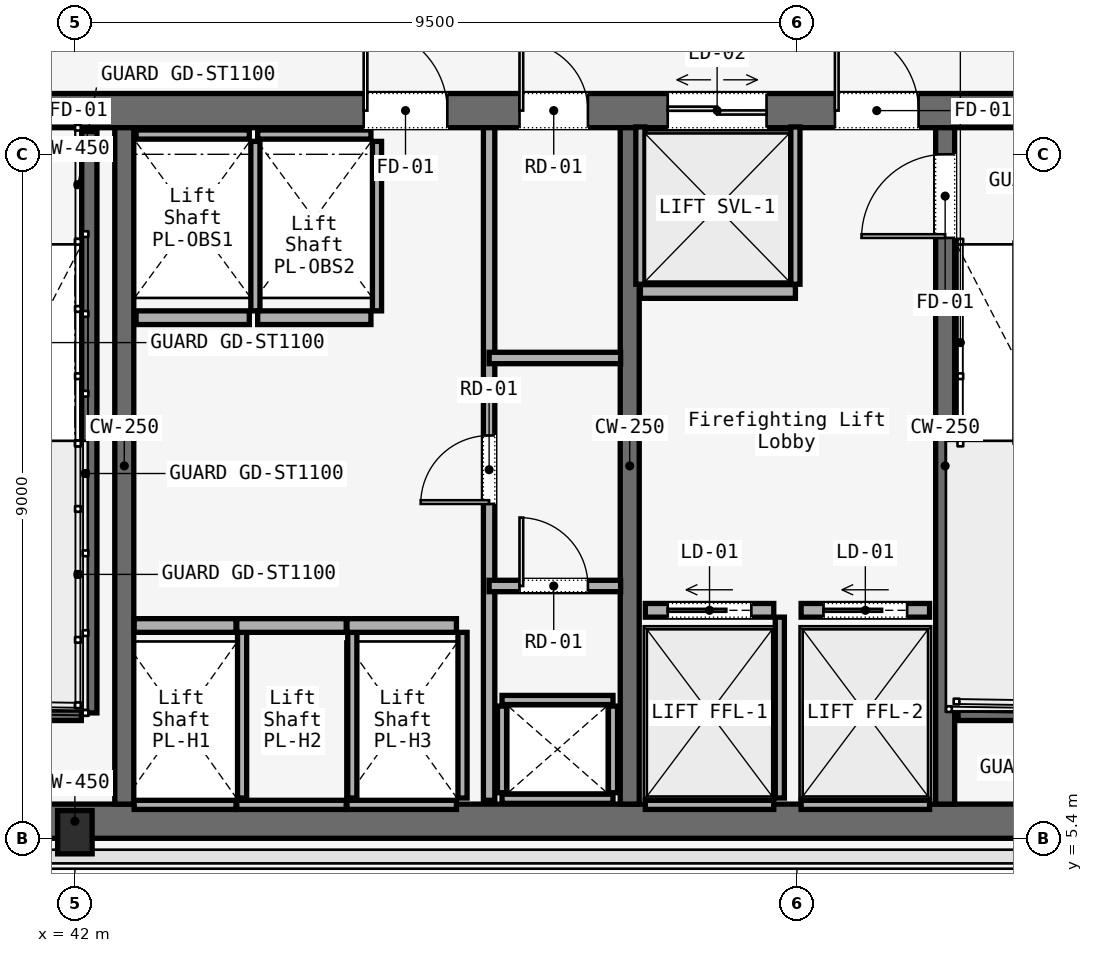
"""IFC4 building model, lengths in metres.
Left out: names, types, materials, properties, quantities, classifications, styles, units other than length and angle.
Written with IfcOpenShell. Run it as: python <this file> out.ifc"""

import sys

from ifc_helpers import new_model, si_unit, direction, frame, frame_2d, origin, origin_2d, place, context, subcontext, project, spatial, rectangle, i_section, extrude, element, fill, save


model = new_model("IFC4")
c1 = context("Model", 3, precision=1e-05, world=origin(), true_north=direction((0.0, 1.0)))
c2 = subcontext(c1, "Body", "Model", "MODEL_VIEW")
j1 = project(units=[si_unit("LENGTHUNIT", "METRE"), si_unit("PLANEANGLEUNIT", "RADIAN")], contexts=[c1])
p1 = place(None, origin())
s1 = spatial("IfcSite", under=j1, at=p1, CompositionType="ELEMENT")
p2 = place(p1, origin())
s2 = spatial("IfcBuilding", under=s1, at=p2, CompositionType="ELEMENT")
p3 = place(p2, frame((0.0, 0.0, 39.8)))
s3 = spatial("IfcBuildingStorey", under=s2, at=p3, CompositionType="ELEMENT", Elevation=39.8)
p4 = place(p3, frame((26.45, 14.975, 0.0), z_axis=(0.0, 0.0, 1.0), x_axis=(1.0, 0.0, 0.0)))
e1 = element("IfcWall", 1, at=p4, inside=s3, PredefinedType="SOLIDWALL", context=c2, shape_type="SweptSolid", body=[
    extrude(rectangle(XDim=31.1, YDim=0.45, at=frame_2d((15.55, 0.0))), origin(), (0.0, 0.0, 1.0), 3.58),
])
p5 = place(p4, frame((1.65, 0.0, 0.0)))
e2 = element("IfcOpeningElement", 2, at=p5, cuts=e1, PredefinedType="OPENING", context=c2, shape_type="SweptSolid", body=[
    extrude(rectangle(XDim=1.1, YDim=2.2, at=frame_2d((0.55, 1.1))), frame((0.0, 0.225, 0.0), z_axis=(0.0, -1.0, 0.0), x_axis=(1.0, 0.0, 0.0)), (0.0, 0.0, 1.0), 0.45),
])
p6 = place(p4, frame((13.65, 0.0, 0.0)))
e3 = element("IfcOpeningElement", 3, at=p6, cuts=e1, PredefinedType="OPENING", context=c2, shape_type="SweptSolid", body=[
    extrude(rectangle(XDim=1.1, YDim=2.2, at=frame_2d((0.55, 1.1))), frame((0.0, 0.225, 0.0), z_axis=(0.0, -1.0, 0.0), x_axis=(1.0, 0.0, 0.0)), (0.0, 0.0, 1.0), 0.45),
])
p7 = place(p4, frame((25.55, 0.0, 0.0)))
e4 = element("IfcOpeningElement", 4, at=p7, cuts=e1, PredefinedType="OPENING", context=c2, shape_type="SweptSolid", body=[
    extrude(rectangle(XDim=1.1, YDim=2.2, at=frame_2d((0.55, 1.1))), frame((0.0, 0.225, 0.0), z_axis=(0.0, -1.0, 0.0), x_axis=(1.0, 0.0, 0.0)), (0.0, 0.0, 1.0), 0.45),
])
p8 = place(p4, frame((10.7, 0.0, 0.0)))
e5 = element("IfcOpeningElement", 5, at=p8, cuts=e1, PredefinedType="OPENING", context=c2, shape_type="SweptSolid", body=[
    extrude(rectangle(XDim=1.4, YDim=2.2, at=frame_2d((0.7, 1.1))), frame((0.0, 0.225, 0.0), z_axis=(0.0, -1.0, 0.0), x_axis=(1.0, 0.0, 0.0)), (0.0, 0.0, 1.0), 0.45),
])
p9 = place(p4, frame((19.35, 0.0, 0.0)))
e6 = element("IfcOpeningElement", 6, at=p9, cuts=e1, PredefinedType="OPENING", context=c2, shape_type="SweptSolid", body=[
    extrude(rectangle(XDim=1.1, YDim=2.2, at=frame_2d((0.55, 1.1))), frame((0.0, 0.225, 0.0), z_axis=(0.0, -1.0, 0.0), x_axis=(1.0, 0.0, 0.0)), (0.0, 0.0, 1.0), 0.45),
])
p10 = place(p4, frame((21.4, 0.0, 0.0)))
e7 = element("IfcOpeningElement", 7, at=p10, cuts=e1, PredefinedType="OPENING", context=c2, shape_type="SweptSolid", body=[
    extrude(rectangle(XDim=0.9, YDim=2.1, at=frame_2d((0.45, 1.05))), frame((0.0, 0.225, 0.0), z_axis=(0.0, -1.0, 0.0), x_axis=(1.0, 0.0, 0.0)), (0.0, 0.0, 1.0), 0.45),
])
p11 = place(p4, frame((23.35, 0.0, 0.0)))
e8 = element("IfcOpeningElement", 8, at=p11, cuts=e1, PredefinedType="OPENING", context=c2, shape_type="SweptSolid", body=[
    extrude(rectangle(XDim=1.3, YDim=2.3, at=frame_2d((0.65, 1.15))), frame((0.0, 0.225, 0.0), z_axis=(0.0, -1.0, 0.0), x_axis=(1.0, 0.0, 0.0)), (0.0, 0.0, 1.0), 0.45),
])
p12 = place(p3, frame((26.45, 5.625, 0.0), z_axis=(0.0, 0.0, 1.0), x_axis=(1.0, 0.0, 0.0)))
e9 = element("IfcWall", 9, at=p12, inside=s3, PredefinedType="SOLIDWALL", context=c2, shape_type="SweptSolid", body=[
    extrude(rectangle(XDim=31.1, YDim=0.45, at=frame_2d((15.55, 0.0))), origin(), (0.0, 0.0, 1.0), 3.58),
])
for number, where, z_axis, x_axis in (
    (10, (42.65, 5.85, 0.0), (0.0, 0.0, 1.0), (0.0, 1.0, 0.0)),
    (11, (49.3, 5.85, 0.0), (0.0, 0.0, 1.0), (0.0, 1.0, 0.0)),
):
    element("IfcWall", number, at=place(p3, frame(where, z_axis=z_axis, x_axis=x_axis)), inside=s3, PredefinedType="SOLIDWALL", context=c2, shape_type="SweptSolid", body=[
        extrude(rectangle(XDim=8.9, YDim=0.25, at=frame_2d((4.45, 0.0))), origin(), (0.0, 0.0, 1.0), 3.58),
    ])
p13 = place(p3, frame((53.45, 5.85, 0.0), z_axis=(0.0, 0.0, 1.0), x_axis=(0.0, 1.0, 0.0)))
e12 = element("IfcWall", 12, at=p13, inside=s3, PredefinedType="SOLIDWALL", context=c2, shape_type="SweptSolid", body=[
    extrude(rectangle(XDim=8.9, YDim=0.25, at=frame_2d((4.45, 0.0))), origin(), (0.0, 0.0, 1.0), 3.58),
])
p14 = place(p13, frame((7.45, 0.0, 0.0)))
e13 = element("IfcOpeningElement", 13, at=p14, cuts=e12, PredefinedType="OPENING", context=c2, shape_type="SweptSolid", body=[
    extrude(rectangle(XDim=1.1, YDim=2.2, at=frame_2d((0.55, 1.1))), frame((0.0, 0.125, 0.0), z_axis=(0.0, -1.0, 0.0), x_axis=(1.0, 0.0, 0.0)), (0.0, 0.0, 1.0), 0.25),
])
p15 = place(p3, frame((42.0, 5.48, 0.0), z_axis=(0.0, 0.0, 1.0), x_axis=(1.0, 0.0, 0.0)))
e14 = element("IfcColumn", 14, at=p15, inside=s3, PredefinedType="COLUMN", context=c2, shape_type="SweptSolid", body=[
    extrude(i_section(OverallWidth=0.454, OverallDepth=0.569, WebThickness=0.078, FlangeThickness=0.08, FilletRadius=0.015, at=origin_2d()), origin(), (0.0, 0.0, 1.0), 3.58),
])
p16 = place(p3, frame((42.19, 14.7, 0.0), z_axis=(0.0, 0.0, 1.0), x_axis=(0.0, -1.0, 0.0)))
e15 = element("IfcWall", 15, at=p16, inside=s3, PredefinedType="SOLIDWALL", context=c2, shape_type="SweptSolid", body=[
    extrude(rectangle(XDim=7.65, YDim=0.2, at=frame_2d((3.825, 0.0))), origin(), (0.0, 0.0, 1.0), 3.8),
])
for number, where, z_axis, x_axis in (
    (16, (38.97, 7.05, 0.0), (0.0, 0.0, 1.0), (1.0, 0.0, 0.0)),
    (17, (53.62, 7.05, 0.0), (0.0, 0.0, 1.0), (1.0, 0.0, 0.0)),
):
    element("IfcWall", number, at=place(p3, frame(where, z_axis=z_axis, x_axis=x_axis)), inside=s3, PredefinedType="SOLIDWALL", context=c2, shape_type="SweptSolid", body=[
        extrude(rectangle(XDim=3.115, YDim=0.2, at=frame_2d((1.558, 0.0))), origin(), (0.0, 0.0, 1.0), 3.8),
    ])
for number, where, z_axis, x_axis in (
    (18, (47.62, 5.92, 0.0), (0.0, 0.0, 1.0), (1.0, 0.0, 0.0)),
    (19, (47.62, 7.22, 0.0), (0.0, 0.0, 1.0), (1.0, 0.0, 0.0)),
):
    element("IfcWall", number, at=place(p3, frame(where, z_axis=z_axis, x_axis=x_axis)), inside=s3, PredefinedType="SOLIDWALL", context=c2, shape_type="SweptSolid", body=[
        extrude(rectangle(XDim=1.46, YDim=0.12, at=frame_2d((0.73, 0.0))), origin(), (0.0, 0.0, 1.0), 2.933),
    ])
for number, where, z_axis, x_axis in (
    (20, (47.62, 6.0, 0.0), (0.0, 0.0, 1.0), (0.0, 1.0, 0.0)),
    (21, (49.08, 6.0, 0.0), (0.0, 0.0, 1.0), (0.0, 1.0, 0.0)),
):
    element("IfcWall", number, at=place(p3, frame(where, z_axis=z_axis, x_axis=x_axis)), inside=s3, PredefinedType="SOLIDWALL", context=c2, shape_type="SweptSolid", body=[
        extrude(rectangle(XDim=1.14, YDim=0.12, at=frame_2d((0.57, 0.0))), origin(), (0.0, 0.0, 1.0), 2.933),
    ])
p17 = place(p3, frame((47.45, 5.9, 0.0), z_axis=(0.0, 0.0, 1.0), x_axis=(0.0, 1.0, 0.0)))
e22 = element("IfcWall", 22, at=p17, inside=s3, PredefinedType="PARTITIONING", context=c2, shape_type="SweptSolid", body=[
    extrude(rectangle(XDim=8.85, YDim=0.15, at=frame_2d((4.425, 0.0))), origin(), (0.0, 0.0, 1.0), 2.933),
])
p18 = place(p17, frame((3.9, 0.0, 0.0)))
e23 = element("IfcOpeningElement", 23, at=p18, cuts=e22, PredefinedType="OPENING", context=c2, shape_type="SweptSolid", body=[
    extrude(rectangle(XDim=0.9, YDim=2.1, at=frame_2d((0.45, 1.05))), frame((0.0, 0.075, 0.0), z_axis=(0.0, -1.0, 0.0), x_axis=(1.0, 0.0, 0.0)), (0.0, 0.0, 1.0), 0.15),
])
p19 = place(p3, frame((47.45, 8.72, 0.0), z_axis=(0.0, 0.0, 1.0), x_axis=(1.0, 0.0, 0.0)))
e24 = element("IfcWall", 24, at=p19, inside=s3, PredefinedType="PARTITIONING", context=c2, shape_type="SweptSolid", body=[
    extrude(rectangle(XDim=1.73, YDim=0.15, at=frame_2d((0.865, 0.0))), origin(), (0.0, 0.0, 1.0), 2.933),
])
p20 = place(p19, frame((0.4, 0.0, 0.0)))
e25 = element("IfcOpeningElement", 25, at=p20, cuts=e24, PredefinedType="OPENING", context=c2, shape_type="SweptSolid", body=[
    extrude(rectangle(XDim=0.9, YDim=2.1, at=frame_2d((0.45, 1.05))), frame((0.0, 0.075, 0.0), z_axis=(0.0, -1.0, 0.0), x_axis=(1.0, 0.0, 0.0)), (0.0, 0.0, 1.0), 0.15),
])
p21 = place(p3, frame((47.45, 11.72, 0.0), z_axis=(0.0, 0.0, 1.0), x_axis=(1.0, 0.0, 0.0)))
e26 = element("IfcWall", 26, at=p21, inside=s3, PredefinedType="PARTITIONING", context=c2, shape_type="SweptSolid", body=[
    extrude(rectangle(XDim=1.73, YDim=0.15, at=frame_2d((0.865, 0.0))), origin(), (0.0, 0.0, 1.0), 2.933),
])
p22 = place(p3, frame((42.78, 8.2, 0.0), z_axis=(0.0, 0.0, 1.0), x_axis=(1.0, 0.0, 0.0)))
e27 = element("IfcWall", 27, at=p22, inside=s3, PredefinedType="SOLIDWALL", context=c2, shape_type="SweptSolid", body=[
    extrude(rectangle(XDim=1.34, YDim=0.18, at=frame_2d((0.67, 0.0))), origin(), (0.0, 0.0, 1.0), 2.933),
])
p23 = place(p3, frame((42.78, 5.84, 0.0), z_axis=(0.0, 0.0, 1.0), x_axis=(1.0, 0.0, 0.0)))
e28 = element("IfcWall", 28, at=p23, inside=s3, PredefinedType="SOLIDWALL", context=c2, shape_type="SweptSolid", body=[
    extrude(rectangle(XDim=1.34, YDim=0.12, at=frame_2d((0.67, 0.0))), origin(), (0.0, 0.0, 1.0), 2.933),
])
p24 = place(p3, frame((44.2, 5.93, 0.0), z_axis=(0.0, 0.0, 1.0), x_axis=(0.0, 1.0, 0.0)))
e29 = element("IfcWall", 29, at=p24, inside=s3, PredefinedType="SOLIDWALL", context=c2, shape_type="SweptSolid", body=[
    extrude(rectangle(XDim=2.18, YDim=0.12, at=frame_2d((1.09, 0.0))), origin(), (0.0, 0.0, 1.0), 2.933),
])
p25 = place(p3, frame((44.13, 8.2, 0.0), z_axis=(0.0, 0.0, 1.0), x_axis=(1.0, 0.0, 0.0)))
e30 = element("IfcWall", 30, at=p25, inside=s3, PredefinedType="SOLIDWALL", context=c2, shape_type="SweptSolid", body=[
    extrude(rectangle(XDim=1.44, YDim=0.18, at=frame_2d((0.72, 0.0))), origin(), (0.0, 0.0, 1.0), 2.933),
])
p26 = place(p3, frame((44.13, 5.84, 0.0), z_axis=(0.0, 0.0, 1.0), x_axis=(1.0, 0.0, 0.0)))
e31 = element("IfcWall", 31, at=p26, inside=s3, PredefinedType="SOLIDWALL", context=c2, shape_type="SweptSolid", body=[
    extrude(rectangle(XDim=1.44, YDim=0.12, at=frame_2d((0.72, 0.0))), origin(), (0.0, 0.0, 1.0), 2.933),
])
p27 = place(p3, frame((45.65, 5.93, 0.0), z_axis=(0.0, 0.0, 1.0), x_axis=(0.0, 1.0, 0.0)))
e32 = element("IfcWall", 32, at=p27, inside=s3, PredefinedType="SOLIDWALL", context=c2, shape_type="SweptSolid", body=[
    extrude(rectangle(XDim=2.18, YDim=0.12, at=frame_2d((1.09, 0.0))), origin(), (0.0, 0.0, 1.0), 2.933),
])
p28 = place(p3, frame((45.58, 8.2, 0.0), z_axis=(0.0, 0.0, 1.0), x_axis=(1.0, 0.0, 0.0)))
e33 = element("IfcWall", 33, at=p28, inside=s3, PredefinedType="SOLIDWALL", context=c2, shape_type="SweptSolid", body=[
    extrude(rectangle(XDim=1.44, YDim=0.18, at=frame_2d((0.72, 0.0))), origin(), (0.0, 0.0, 1.0), 2.933),
])
p29 = place(p3, frame((45.58, 5.84, 0.0), z_axis=(0.0, 0.0, 1.0), x_axis=(1.0, 0.0, 0.0)))
e34 = element("IfcWall", 34, at=p29, inside=s3, PredefinedType="SOLIDWALL", context=c2, shape_type="SweptSolid", body=[
    extrude(rectangle(XDim=1.44, YDim=0.12, at=frame_2d((0.72, 0.0))), origin(), (0.0, 0.0, 1.0), 2.933),
])
p30 = place(p3, frame((47.1, 5.93, 0.0), z_axis=(0.0, 0.0, 1.0), x_axis=(0.0, 1.0, 0.0)))
e35 = element("IfcWall", 35, at=p30, inside=s3, PredefinedType="SOLIDWALL", context=c2, shape_type="SweptSolid", body=[
    extrude(rectangle(XDim=2.18, YDim=0.12, at=frame_2d((1.09, 0.0))), origin(), (0.0, 0.0, 1.0), 2.933),
])
p31 = place(p3, frame((42.805, 12.25, 0.0), z_axis=(0.0, 0.0, 1.0), x_axis=(1.0, 0.0, 0.0)))
e36 = element("IfcWall", 36, at=p31, inside=s3, PredefinedType="SOLIDWALL", context=c2, shape_type="SweptSolid", body=[
    extrude(rectangle(XDim=1.49, YDim=0.18, at=frame_2d((0.745, 0.0))), origin(), (0.0, 0.0, 1.0), 2.933),
])
p32 = place(p3, frame((42.805, 14.66, 0.0), z_axis=(0.0, 0.0, 1.0), x_axis=(1.0, 0.0, 0.0)))
e37 = element("IfcWall", 37, at=p32, inside=s3, PredefinedType="SOLIDWALL", context=c2, shape_type="SweptSolid", body=[
    extrude(rectangle(XDim=1.49, YDim=0.12, at=frame_2d((0.745, 0.0))), origin(), (0.0, 0.0, 1.0), 2.933),
])
p33 = place(p3, frame((44.375, 12.34, 0.0), z_axis=(0.0, 0.0, 1.0), x_axis=(0.0, 1.0, 0.0)))
e38 = element("IfcWall", 38, at=p33, inside=s3, PredefinedType="SOLIDWALL", context=c2, shape_type="SweptSolid", body=[
    extrude(rectangle(XDim=2.23, YDim=0.12, at=frame_2d((1.115, 0.0))), origin(), (0.0, 0.0, 1.0), 2.933),
])
p34 = place(p3, frame((44.405, 12.25, 0.0), z_axis=(0.0, 0.0, 1.0), x_axis=(1.0, 0.0, 0.0)))
e39 = element("IfcWall", 39, at=p34, inside=s3, PredefinedType="SOLIDWALL", context=c2, shape_type="SweptSolid", body=[
    extrude(rectangle(XDim=1.49, YDim=0.18, at=frame_2d((0.745, 0.0))), origin(), (0.0, 0.0, 1.0), 2.933),
])
p35 = place(p3, frame((44.405, 14.66, 0.0), z_axis=(0.0, 0.0, 1.0), x_axis=(1.0, 0.0, 0.0)))
e40 = element("IfcWall", 40, at=p35, inside=s3, PredefinedType="SOLIDWALL", context=c2, shape_type="SweptSolid", body=[
    extrude(rectangle(XDim=1.49, YDim=0.12, at=frame_2d((0.745, 0.0))), origin(), (0.0, 0.0, 1.0), 2.933),
])
p36 = place(p3, frame((45.975, 12.34, 0.0), z_axis=(0.0, 0.0, 1.0), x_axis=(0.0, 1.0, 0.0)))
e41 = element("IfcWall", 41, at=p36, inside=s3, PredefinedType="SOLIDWALL", context=c2, shape_type="SweptSolid", body=[
    extrude(rectangle(XDim=2.23, YDim=0.12, at=frame_2d((1.115, 0.0))), origin(), (0.0, 0.0, 1.0), 2.933),
])
p37 = place(p3, frame((49.505, 8.4, 0.0), z_axis=(0.0, 0.0, 1.0), x_axis=(1.0, 0.0, 0.0)))
e42 = element("IfcWall", 42, at=p37, inside=s3, PredefinedType="SOLIDWALL", context=c2, shape_type="SweptSolid", body=[
    extrude(rectangle(XDim=1.69, YDim=0.18, at=frame_2d((0.845, 0.0))), origin(), (0.0, 0.0, 1.0), 2.933),
])
p38 = place(p37, frame((0.295, 0.0, 0.0)))
e43 = element("IfcOpeningElement", 43, at=p38, cuts=e42, PredefinedType="OPENING", context=c2, shape_type="SweptSolid", body=[
    extrude(rectangle(XDim=1.1, YDim=2.2, at=frame_2d((0.55, 1.1))), frame((0.0, 0.09, 0.0), z_axis=(0.0, -1.0, 0.0), x_axis=(1.0, 0.0, 0.0)), (0.0, 0.0, 1.0), 0.18),
])
p39 = place(p3, frame((49.505, 5.84, 0.0), z_axis=(0.0, 0.0, 1.0), x_axis=(1.0, 0.0, 0.0)))
e44 = element("IfcWall", 44, at=p39, inside=s3, PredefinedType="SOLIDWALL", context=c2, shape_type="SweptSolid", body=[
    extrude(rectangle(XDim=1.69, YDim=0.12, at=frame_2d((0.845, 0.0))), origin(), (0.0, 0.0, 1.0), 2.933),
])
p40 = place(p3, frame((51.275, 5.93, 0.0), z_axis=(0.0, 0.0, 1.0), x_axis=(0.0, 1.0, 0.0)))
e45 = element("IfcWall", 45, at=p40, inside=s3, PredefinedType="SOLIDWALL", context=c2, shape_type="SweptSolid", body=[
    extrude(rectangle(XDim=2.38, YDim=0.12, at=frame_2d((1.19, 0.0))), origin(), (0.0, 0.0, 1.0), 2.933),
])
p41 = place(p3, frame((51.555, 8.4, 0.0), z_axis=(0.0, 0.0, 1.0), x_axis=(1.0, 0.0, 0.0)))
e46 = element("IfcWall", 46, at=p41, inside=s3, PredefinedType="SOLIDWALL", context=c2, shape_type="SweptSolid", body=[
    extrude(rectangle(XDim=1.69, YDim=0.18, at=frame_2d((0.845, 0.0))), origin(), (0.0, 0.0, 1.0), 2.933),
])
p42 = place(p41, frame((0.295, 0.0, 0.0)))
e47 = element("IfcOpeningElement", 47, at=p42, cuts=e46, PredefinedType="OPENING", context=c2, shape_type="SweptSolid", body=[
    extrude(rectangle(XDim=1.1, YDim=2.2, at=frame_2d((0.55, 1.1))), frame((0.0, 0.09, 0.0), z_axis=(0.0, -1.0, 0.0), x_axis=(1.0, 0.0, 0.0)), (0.0, 0.0, 1.0), 0.18),
])
p43 = place(p3, frame((51.555, 5.84, 0.0), z_axis=(0.0, 0.0, 1.0), x_axis=(1.0, 0.0, 0.0)))
e48 = element("IfcWall", 48, at=p43, inside=s3, PredefinedType="SOLIDWALL", context=c2, shape_type="SweptSolid", body=[
    extrude(rectangle(XDim=1.69, YDim=0.12, at=frame_2d((0.845, 0.0))), origin(), (0.0, 0.0, 1.0), 2.933),
])
p44 = place(p3, frame((49.44, 12.595, 0.0), z_axis=(0.0, 0.0, 1.0), x_axis=(1.0, 0.0, 0.0)))
e49 = element("IfcWall", 49, at=p44, inside=s3, PredefinedType="SOLIDWALL", context=c2, shape_type="SweptSolid", body=[
    extrude(rectangle(XDim=2.04, YDim=0.18, at=frame_2d((1.02, 0.0))), origin(), (0.0, 0.0, 1.0), 2.933),
])
for number, where, z_axis, x_axis in (
    (50, (49.44, 12.69, 0.0), (0.0, 0.0, 1.0), (0.0, 1.0, 0.0)),
    (51, (51.48, 12.69, 0.0), (0.0, 0.0, 1.0), (0.0, 1.0, 0.0)),
):
    element("IfcWall", number, at=place(p3, frame(where, z_axis=z_axis, x_axis=x_axis)), inside=s3, PredefinedType="SOLIDWALL", context=c2, shape_type="SweptSolid", body=[
        extrude(rectangle(XDim=2.07, YDim=0.12, at=frame_2d((1.035, 0.0))), origin(), (0.0, 0.0, 1.0), 2.933),
    ])
p45 = place(p7, origin())
e52 = element("IfcDoor", 52, at=p45, inside=s3, OperationType="SINGLE_SWING_RIGHT", PredefinedType="DOOR", context=c2, shape_type="SweptSolid", body=[
    extrude(rectangle(XDim=1.1, YDim=2.2, at=frame_2d((0.55, 1.1))), frame((0.0, 0.025, 0.0), z_axis=(0.0, -1.0, 0.0), x_axis=(1.0, 0.0, 0.0)), (0.0, 0.0, 1.0), 0.05),
])
fill(e4, e52)
p46 = place(p9, origin())
e53 = element("IfcDoor", 53, at=p46, inside=s3, OperationType="SINGLE_SWING_LEFT", PredefinedType="DOOR", context=c2, shape_type="SweptSolid", body=[
    extrude(rectangle(XDim=1.1, YDim=2.2, at=frame_2d((0.55, 1.1))), frame((0.0, 0.025, 0.0), z_axis=(0.0, -1.0, 0.0), x_axis=(1.0, 0.0, 0.0)), (0.0, 0.0, 1.0), 0.05),
])
fill(e6, e53)
p47 = place(p10, origin())
e54 = element("IfcDoor", 54, at=p47, inside=s3, OperationType="SINGLE_SWING_LEFT", PredefinedType="DOOR", context=c2, shape_type="SweptSolid", body=[
    extrude(rectangle(XDim=0.9, YDim=2.1, at=frame_2d((0.45, 1.05))), frame((0.0, 0.025, 0.0), z_axis=(0.0, -1.0, 0.0), x_axis=(1.0, 0.0, 0.0)), (0.0, 0.0, 1.0), 0.05),
])
fill(e7, e54)
p48 = place(p14, origin())
e55 = element("IfcDoor", 55, at=p48, inside=s3, OperationType="SINGLE_SWING_LEFT", PredefinedType="DOOR", context=c2, shape_type="SweptSolid", body=[
    extrude(rectangle(XDim=1.1, YDim=2.2, at=frame_2d((0.55, 1.1))), frame((0.0, 0.025, 0.0), z_axis=(0.0, -1.0, 0.0), x_axis=(1.0, 0.0, 0.0)), (0.0, 0.0, 1.0), 0.05),
])
fill(e13, e55)
p49 = place(p18, origin())
e56 = element("IfcDoor", 56, at=p49, inside=s3, OperationType="SINGLE_SWING_LEFT", PredefinedType="DOOR", context=c2, shape_type="SweptSolid", body=[
    extrude(rectangle(XDim=0.9, YDim=2.1, at=frame_2d((0.45, 1.05))), frame((0.0, 0.025, 0.0), z_axis=(0.0, -1.0, 0.0), x_axis=(1.0, 0.0, 0.0)), (0.0, 0.0, 1.0), 0.05),
])
fill(e23, e56)
p50 = place(p20, origin())
e57 = element("IfcDoor", 57, at=p50, inside=s3, OperationType="SINGLE_SWING_RIGHT", PredefinedType="DOOR", context=c2, shape_type="SweptSolid", body=[
    extrude(rectangle(XDim=0.9, YDim=2.1, at=frame_2d((0.45, 1.05))), frame((0.0, 0.025, 0.0), z_axis=(0.0, -1.0, 0.0), x_axis=(1.0, 0.0, 0.0)), (0.0, 0.0, 1.0), 0.05),
])
fill(e25, e57)
p51 = place(p38, origin())
e58 = element("IfcDoor", 58, at=p51, inside=s3, OperationType="SLIDING_TO_LEFT", PredefinedType="DOOR", context=c2, shape_type="SweptSolid", body=[
    extrude(rectangle(XDim=1.1, YDim=2.2, at=frame_2d((0.55, 1.1))), frame((0.0, 0.025, 0.0), z_axis=(0.0, -1.0, 0.0), x_axis=(1.0, 0.0, 0.0)), (0.0, 0.0, 1.0), 0.05),
])
fill(e43, e58)
p52 = place(p42, origin())
e59 = element("IfcDoor", 59, at=p52, inside=s3, OperationType="SLIDING_TO_LEFT", PredefinedType="DOOR", context=c2, shape_type="SweptSolid", body=[
    extrude(rectangle(XDim=1.1, YDim=2.2, at=frame_2d((0.55, 1.1))), frame((0.0, 0.025, 0.0), z_axis=(0.0, -1.0, 0.0), x_axis=(1.0, 0.0, 0.0)), (0.0, 0.0, 1.0), 0.05),
])
fill(e47, e59)
p53 = place(p11, origin())
e60 = element("IfcDoor", 60, at=p53, inside=s3, OperationType="DOUBLE_DOOR_SLIDING", PredefinedType="DOOR", context=c2, shape_type="SweptSolid", body=[
    extrude(rectangle(XDim=1.3, YDim=2.3, at=frame_2d((0.65, 1.15))), frame((0.0, 0.025, 0.0), z_axis=(0.0, -1.0, 0.0), x_axis=(1.0, 0.0, 0.0)), (0.0, 0.0, 1.0), 0.05),
])
fill(e8, e60)
save(model, sys.argv[1])
